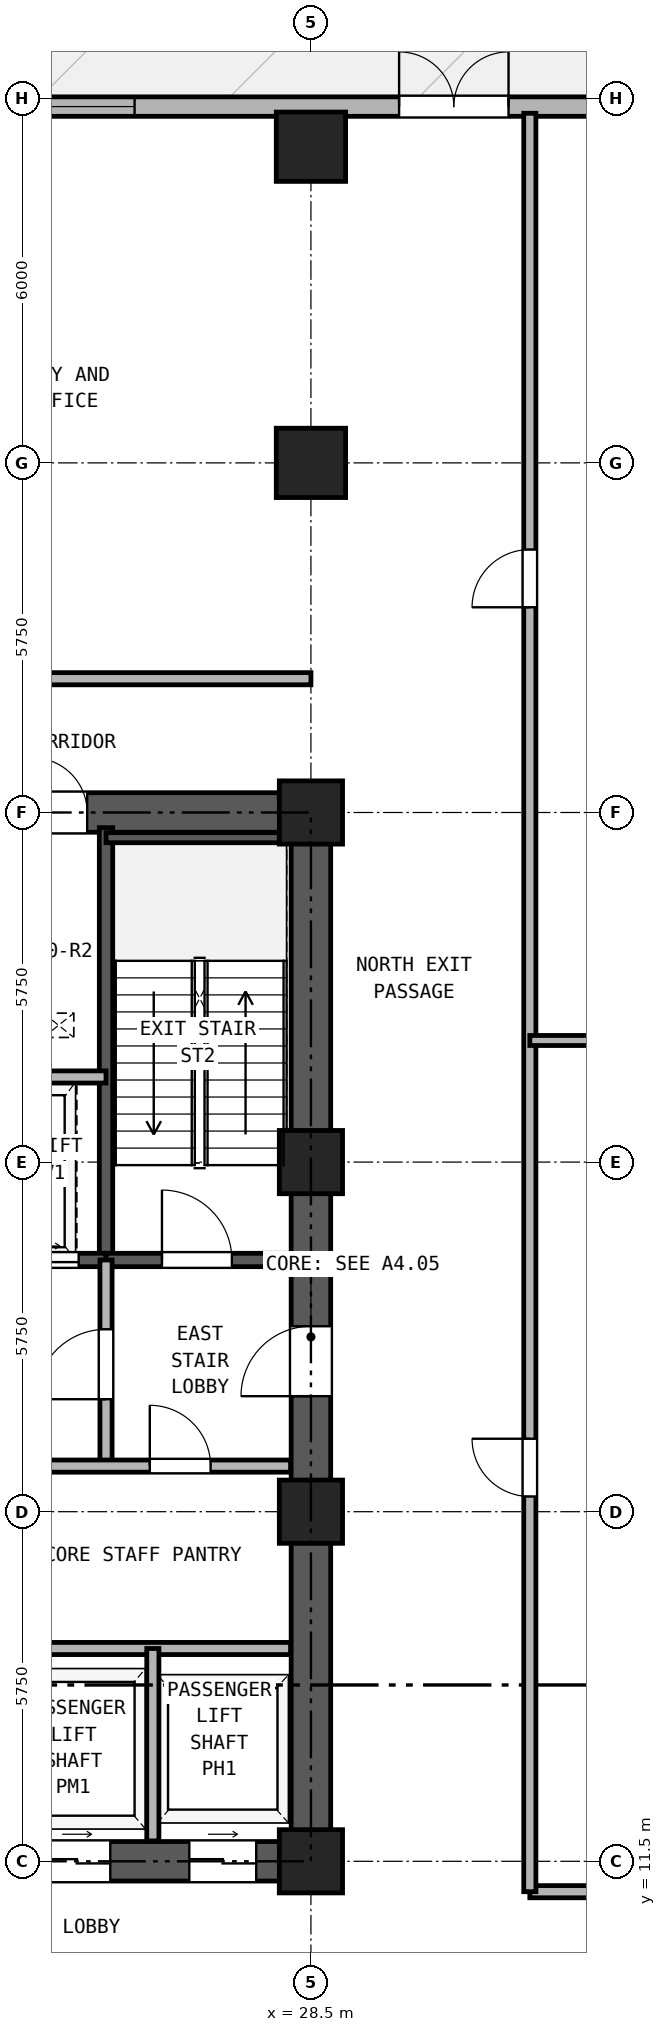
"""IFC4 building model, lengths in metres.
Left out: names, types, materials, properties, quantities, classifications, styles, units other than length and angle.
Written with IfcOpenShell. Run it as: python <this file> out.ifc"""

import sys

from ifc_helpers import new_model, si_unit, direction, frame, frame_2d, origin, origin_2d, place, context, subcontext, project, spatial, rectangle, hollow_rectangle, extrude, source, transform, mapped, element, fill, save


model = new_model("IFC4")
c1 = context("Model", 3, precision=1e-05, world=origin(), true_north=direction((0.0, 1.0)))
c2 = subcontext(c1, "Body", "Model", "MODEL_VIEW")
j1 = project(units=[si_unit("LENGTHUNIT", "METRE"), si_unit("PLANEANGLEUNIT", "RADIAN")], contexts=[c1])
p1 = place(None, origin())
s1 = spatial("IfcSite", under=j1, at=p1, CompositionType="ELEMENT")
p2 = place(p1, origin())
s2 = spatial("IfcBuilding", under=s1, at=p2, CompositionType="ELEMENT")
p3 = place(p2, origin())
s3 = spatial("IfcBuildingStorey", under=s2, at=p3, CompositionType="ELEMENT", Elevation=0.0)
m1 = source(origin(), c2, "Body", "SweptSolid", [
    extrude(hollow_rectangle(XDim=1.14, YDim=1.14, WallThickness=0.07, at=origin_2d()), origin(), (0.0, 0.0, 1.0), 4.18),
])
p4 = place(p3, frame((28.5, 39.7, 0.0), z_axis=(0.0, 0.0, 1.0), x_axis=(1.0, 0.0, 0.0)))
e1 = element("IfcColumn", 1, at=p4, inside=s3, PredefinedType="COLUMN", context=c2, shape_type="MappedRepresentation", body=[
    mapped(m1, transform((0.0, 0.0, 0.0), x_axis=(1.0, 0.0, 0.0), y_axis=(0.0, 1.0, 0.0), z_axis=(0.0, 0.0, 1.0), scale=1.0)),
])
m2 = source(origin(), c2, "Body", "SweptSolid", [
    extrude(hollow_rectangle(XDim=1.04, YDim=1.04, WallThickness=0.065, at=origin_2d()), origin(), (0.0, 0.0, 1.0), 4.18),
])
for number, where, z_axis, x_axis in (
    (2, (28.5, 11.5, 0.0), (0.0, 0.0, 1.0), (1.0, 0.0, 0.0)),
    (3, (28.5, 17.25, 0.0), (0.0, 0.0, 1.0), (1.0, 0.0, 0.0)),
    (4, (28.5, 23.0, 0.0), (0.0, 0.0, 1.0), (1.0, 0.0, 0.0)),
    (5, (28.5, 28.75, 0.0), (0.0, 0.0, 1.0), (1.0, 0.0, 0.0)),
):
    element("IfcColumn", number, at=place(p3, frame(where, z_axis=z_axis, x_axis=x_axis)), inside=s3, PredefinedType="COLUMN", context=c2, shape_type="MappedRepresentation", body=[
        mapped(m2, transform((0.0, 0.0, 0.0), x_axis=(1.0, 0.0, 0.0), y_axis=(0.0, 1.0, 0.0), z_axis=(0.0, 0.0, 1.0), scale=1.0)),
    ])
p5 = place(p3, frame((28.5, 34.5, 0.0), z_axis=(0.0, 0.0, 1.0), x_axis=(1.0, 0.0, 0.0)))
e6 = element("IfcColumn", 6, at=p5, inside=s3, PredefinedType="COLUMN", context=c2, shape_type="MappedRepresentation", body=[
    mapped(m1, transform((0.0, 0.0, 0.0), x_axis=(1.0, 0.0, 0.0), y_axis=(0.0, 1.0, 0.0), z_axis=(0.0, 0.0, 1.0), scale=1.0)),
])
p6 = place(p3, frame((4.0, 40.36, 0.0), z_axis=(0.0, 0.0, 1.0), x_axis=(1.0, 0.0, 0.0)))
e7 = element("IfcWall", 7, at=p6, inside=s3, PredefinedType="SOLIDWALL", context=c2, shape_type="SweptSolid", body=[
    extrude(rectangle(XDim=39.0, YDim=0.32, at=frame_2d((19.5, 0.0))), origin(), (0.0, 0.0, 1.0), 4.18),
])
p7 = place(p6, frame((12.1, 0.0, 0.0)))
e8 = element("IfcOpeningElement", 8, at=p7, cuts=e7, PredefinedType="OPENING", context=c2, shape_type="SweptSolid", body=[
    extrude(rectangle(XDim=1.8, YDim=2.35, at=frame_2d((0.9, 1.175))), frame((0.0, 0.17, 0.0), z_axis=(0.0, -1.0, 0.0), x_axis=(1.0, 0.0, 0.0)), (0.0, 0.0, 1.0), 0.34),
])
p8 = place(p6, frame((25.95, 0.0, 0.0)))
e9 = element("IfcOpeningElement", 9, at=p8, cuts=e7, PredefinedType="OPENING", context=c2, shape_type="SweptSolid", body=[
    extrude(rectangle(XDim=1.8, YDim=2.35, at=frame_2d((0.9, 1.175))), frame((0.0, 0.17, 0.0), z_axis=(0.0, -1.0, 0.0), x_axis=(1.0, 0.0, 0.0)), (0.0, 0.0, 1.0), 0.34),
])
p9 = place(p6, frame((4.2, 0.0, 0.9)))
e10 = element("IfcOpeningElement", 10, at=p9, cuts=e7, PredefinedType="OPENING", context=c2, shape_type="SweptSolid", body=[
    extrude(rectangle(XDim=2.4, YDim=2.1, at=frame_2d((1.2, 1.05))), frame((0.0, 0.17, 0.0), z_axis=(0.0, -1.0, 0.0), x_axis=(1.0, 0.0, 0.0)), (0.0, 0.0, 1.0), 0.34),
])
p10 = place(p6, frame((19.2, 0.0, 0.9)))
e11 = element("IfcOpeningElement", 11, at=p10, cuts=e7, PredefinedType="OPENING", context=c2, shape_type="SweptSolid", body=[
    extrude(rectangle(XDim=2.4, YDim=2.1, at=frame_2d((1.2, 1.05))), frame((0.0, 0.17, 0.0), z_axis=(0.0, -1.0, 0.0), x_axis=(1.0, 0.0, 0.0)), (0.0, 0.0, 1.0), 0.34),
])
p11 = place(p6, frame((31.8, 0.0, 0.9)))
e12 = element("IfcOpeningElement", 12, at=p11, cuts=e7, PredefinedType="OPENING", context=c2, shape_type="SweptSolid", body=[
    extrude(rectangle(XDim=2.4, YDim=2.1, at=frame_2d((1.2, 1.05))), frame((0.0, 0.17, 0.0), z_axis=(0.0, -1.0, 0.0), x_axis=(1.0, 0.0, 0.0)), (0.0, 0.0, 1.0), 0.34),
])
p12 = place(p3, frame((18.175, 11.5, 0.0), z_axis=(0.0, 0.0, 1.0), x_axis=(1.0, 0.0, 0.0)))
e13 = element("IfcWall", 13, at=p12, inside=s3, PredefinedType="SHEAR", context=c2, shape_type="SweptSolid", body=[
    extrude(rectangle(XDim=10.65, YDim=0.65, at=frame_2d((5.325, 0.0))), origin(), (0.0, 0.0, 1.0), 4.18),
])
p13 = place(p12, frame((1.195, 0.0, 0.0)))
e14 = element("IfcOpeningElement", 14, at=p13, cuts=e13, PredefinedType="OPENING", context=c2, shape_type="SweptSolid", body=[
    extrude(rectangle(XDim=1.1, YDim=2.25, at=frame_2d((0.55, 1.125))), frame((0.0, 0.335, 0.0), z_axis=(0.0, -1.0, 0.0), x_axis=(1.0, 0.0, 0.0)), (0.0, 0.0, 1.0), 0.67),
])
p14 = place(p12, frame((3.495, 0.0, 0.0)))
e15 = element("IfcOpeningElement", 15, at=p14, cuts=e13, PredefinedType="OPENING", context=c2, shape_type="SweptSolid", body=[
    extrude(rectangle(XDim=1.1, YDim=2.25, at=frame_2d((0.55, 1.125))), frame((0.0, 0.335, 0.0), z_axis=(0.0, -1.0, 0.0), x_axis=(1.0, 0.0, 0.0)), (0.0, 0.0, 1.0), 0.67),
])
p15 = place(p12, frame((5.925, 0.0, 0.0)))
e16 = element("IfcOpeningElement", 16, at=p15, cuts=e13, PredefinedType="OPENING", context=c2, shape_type="SweptSolid", body=[
    extrude(rectangle(XDim=1.1, YDim=2.25, at=frame_2d((0.55, 1.125))), frame((0.0, 0.335, 0.0), z_axis=(0.0, -1.0, 0.0), x_axis=(1.0, 0.0, 0.0)), (0.0, 0.0, 1.0), 0.67),
])
p16 = place(p12, frame((8.325, 0.0, 0.0)))
e17 = element("IfcOpeningElement", 17, at=p16, cuts=e13, PredefinedType="OPENING", context=c2, shape_type="SweptSolid", body=[
    extrude(rectangle(XDim=1.1, YDim=2.25, at=frame_2d((0.55, 1.125))), frame((0.0, 0.335, 0.0), z_axis=(0.0, -1.0, 0.0), x_axis=(1.0, 0.0, 0.0)), (0.0, 0.0, 1.0), 0.67),
])
p17 = place(p3, frame((18.175, 28.75, 0.0), z_axis=(0.0, 0.0, 1.0), x_axis=(1.0, 0.0, 0.0)))
e18 = element("IfcWall", 18, at=p17, inside=s3, PredefinedType="SHEAR", context=c2, shape_type="SweptSolid", body=[
    extrude(rectangle(XDim=10.65, YDim=0.65, at=frame_2d((5.325, 0.0))), origin(), (0.0, 0.0, 1.0), 4.18),
])
p18 = place(p17, frame((4.205, 0.0, 0.0)))
e19 = element("IfcOpeningElement", 19, at=p18, cuts=e18, PredefinedType="OPENING", context=c2, shape_type="SweptSolid", body=[
    extrude(rectangle(XDim=0.9, YDim=2.05, at=frame_2d((0.45, 1.025))), frame((0.0, 0.335, 0.0), z_axis=(0.0, -1.0, 0.0), x_axis=(1.0, 0.0, 0.0)), (0.0, 0.0, 1.0), 0.67),
])
p19 = place(p17, frame((5.745, 0.0, 0.0)))
e20 = element("IfcOpeningElement", 20, at=p19, cuts=e18, PredefinedType="OPENING", context=c2, shape_type="SweptSolid", body=[
    extrude(rectangle(XDim=0.9, YDim=2.05, at=frame_2d((0.45, 1.025))), frame((0.0, 0.335, 0.0), z_axis=(0.0, -1.0, 0.0), x_axis=(1.0, 0.0, 0.0)), (0.0, 0.0, 1.0), 0.67),
])
p20 = place(p3, frame((28.5, 11.825, 0.0), z_axis=(0.0, 0.0, 1.0), x_axis=(0.0, 1.0, 0.0)))
e21 = element("IfcWall", 21, at=p20, inside=s3, PredefinedType="SHEAR", context=c2, shape_type="SweptSolid", body=[
    extrude(rectangle(XDim=16.6, YDim=0.65, at=frame_2d((8.3, 0.0))), origin(), (0.0, 0.0, 1.0), 4.18),
])
p21 = place(p20, frame((7.325, 0.0, 0.0)))
e22 = element("IfcOpeningElement", 22, at=p21, cuts=e21, PredefinedType="OPENING", context=c2, shape_type="SweptSolid", body=[
    extrude(rectangle(XDim=1.15, YDim=2.2, at=frame_2d((0.575, 1.1))), frame((0.0, 0.335, 0.0), z_axis=(0.0, -1.0, 0.0), x_axis=(1.0, 0.0, 0.0)), (0.0, 0.0, 1.0), 0.67),
])
p22 = place(p3, frame((25.13, 21.39, 0.0), z_axis=(0.0, 0.0, 1.0), x_axis=(0.0, 1.0, 0.0)))
e23 = element("IfcWall", 23, at=p22, inside=s3, PredefinedType="SOLIDWALL", context=c2, shape_type="SweptSolid", body=[
    extrude(rectangle(XDim=7.11, YDim=0.22, at=frame_2d((3.555, 0.0))), origin(), (0.0, 0.0, 1.0), 4.18),
])
p23 = place(p3, frame((25.13, 28.335, 0.0), z_axis=(0.0, 0.0, 1.0), x_axis=(1.0, 0.0, 0.0)))
e24 = element("IfcWall", 24, at=p23, inside=s3, PredefinedType="PARTITIONING", context=c2, shape_type="SweptSolid", body=[
    extrude(rectangle(XDim=3.035, YDim=0.165, at=frame_2d((1.518, 0.0))), origin(), (0.0, 0.0, 1.0), 4.18),
])
p24 = place(p3, frame((18.835, 21.39, 0.0), z_axis=(0.0, 0.0, 1.0), x_axis=(1.0, 0.0, 0.0)))
e25 = element("IfcWall", 25, at=p24, inside=s3, PredefinedType="SOLIDWALL", context=c2, shape_type="SweptSolid", body=[
    extrude(rectangle(XDim=6.295, YDim=0.22, at=frame_2d((3.147, 0.0))), origin(), (0.0, 0.0, 1.0), 4.18),
])
p25 = place(p24, frame((1.015, 0.0, 0.0)))
e26 = element("IfcOpeningElement", 26, at=p25, cuts=e25, PredefinedType="OPENING", context=c2, shape_type="SweptSolid", body=[
    extrude(rectangle(XDim=1.15, YDim=2.2, at=frame_2d((0.575, 1.1))), frame((0.0, 0.12, 0.0), z_axis=(0.0, -1.0, 0.0), x_axis=(1.0, 0.0, 0.0)), (0.0, 0.0, 1.0), 0.24),
])
p26 = place(p24, frame((4.745, 0.0, 0.0)))
e27 = element("IfcOpeningElement", 27, at=p26, cuts=e25, PredefinedType="OPENING", context=c2, shape_type="SweptSolid", body=[
    extrude(rectangle(XDim=1.1, YDim=2.25, at=frame_2d((0.55, 1.125))), frame((0.0, 0.12, 0.0), z_axis=(0.0, -1.0, 0.0), x_axis=(1.0, 0.0, 0.0)), (0.0, 0.0, 1.0), 0.24),
])
p27 = place(p3, frame((25.13, 21.39, 0.0), z_axis=(0.0, 0.0, 1.0), x_axis=(1.0, 0.0, 0.0)))
e28 = element("IfcWall", 28, at=p27, inside=s3, PredefinedType="SOLIDWALL", context=c2, shape_type="SweptSolid", body=[
    extrude(rectangle(XDim=3.035, YDim=0.22, at=frame_2d((1.518, 0.0))), origin(), (0.0, 0.0, 1.0), 4.18),
])
p28 = place(p27, frame((0.92, 0.0, 0.0)))
e29 = element("IfcOpeningElement", 29, at=p28, cuts=e28, PredefinedType="OPENING", context=c2, shape_type="SweptSolid", body=[
    extrude(rectangle(XDim=1.15, YDim=2.2, at=frame_2d((0.575, 1.1))), frame((0.0, 0.12, 0.0), z_axis=(0.0, -1.0, 0.0), x_axis=(1.0, 0.0, 0.0)), (0.0, 0.0, 1.0), 0.24),
])
p29 = place(p3, frame((22.11, 24.4, 0.0), z_axis=(0.0, 0.0, 1.0), x_axis=(1.0, 0.0, 0.0)))
e30 = element("IfcWall", 30, at=p29, inside=s3, PredefinedType="PARTITIONING", context=c2, shape_type="SweptSolid", body=[
    extrude(rectangle(XDim=3.02, YDim=0.2, at=frame_2d((1.51, 0.0))), origin(), (0.0, 0.0, 1.0), 4.18),
])
p30 = place(p3, frame((25.13, 18.0, 0.0), z_axis=(0.0, 0.0, 1.0), x_axis=(0.0, 1.0, 0.0)))
e31 = element("IfcWall", 31, at=p30, inside=s3, PredefinedType="PARTITIONING", context=c2, shape_type="SweptSolid", body=[
    extrude(rectangle(XDim=3.39, YDim=0.2, at=frame_2d((1.695, 0.0))), origin(), (0.0, 0.0, 1.0), 4.18),
])
p31 = place(p30, frame((1.1, 0.0, 0.0)))
e32 = element("IfcOpeningElement", 32, at=p31, cuts=e31, PredefinedType="OPENING", context=c2, shape_type="SweptSolid", body=[
    extrude(rectangle(XDim=1.15, YDim=2.2, at=frame_2d((0.575, 1.1))), frame((0.0, 0.11, 0.0), z_axis=(0.0, -1.0, 0.0), x_axis=(1.0, 0.0, 0.0)), (0.0, 0.0, 1.0), 0.22),
])
p32 = place(p3, frame((18.835, 18.0, 0.0), z_axis=(0.0, 0.0, 1.0), x_axis=(1.0, 0.0, 0.0)))
e33 = element("IfcWall", 33, at=p32, inside=s3, PredefinedType="PARTITIONING", context=c2, shape_type="SweptSolid", body=[
    extrude(rectangle(XDim=9.33, YDim=0.2, at=frame_2d((4.665, 0.0))), origin(), (0.0, 0.0, 1.0), 4.18),
])
p33 = place(p32, frame((0.415, 0.0, 0.0)))
e34 = element("IfcOpeningElement", 34, at=p33, cuts=e33, PredefinedType="OPENING", context=c2, shape_type="SweptSolid", body=[
    extrude(rectangle(XDim=1.3, YDim=2.3, at=frame_2d((0.65, 1.15))), frame((0.0, 0.11, 0.0), z_axis=(0.0, -1.0, 0.0), x_axis=(1.0, 0.0, 0.0)), (0.0, 0.0, 1.0), 0.22),
])
p34 = place(p32, frame((2.515, 0.0, 0.0)))
e35 = element("IfcOpeningElement", 35, at=p34, cuts=e33, PredefinedType="OPENING", context=c2, shape_type="SweptSolid", body=[
    extrude(rectangle(XDim=1.3, YDim=2.3, at=frame_2d((0.65, 1.15))), frame((0.0, 0.11, 0.0), z_axis=(0.0, -1.0, 0.0), x_axis=(1.0, 0.0, 0.0)), (0.0, 0.0, 1.0), 0.22),
])
p35 = place(p32, frame((7.015, 0.0, 0.0)))
e36 = element("IfcOpeningElement", 36, at=p35, cuts=e33, PredefinedType="OPENING", context=c2, shape_type="SweptSolid", body=[
    extrude(rectangle(XDim=1.0, YDim=2.15, at=frame_2d((0.5, 1.075))), frame((0.0, 0.11, 0.0), z_axis=(0.0, -1.0, 0.0), x_axis=(1.0, 0.0, 0.0)), (0.0, 0.0, 1.0), 0.22),
])
p36 = place(p3, frame((18.835, 15.0, 0.0), z_axis=(0.0, 0.0, 1.0), x_axis=(1.0, 0.0, 0.0)))
e37 = element("IfcWall", 37, at=p36, inside=s3, PredefinedType="PARTITIONING", context=c2, shape_type="SweptSolid", body=[
    extrude(rectangle(XDim=9.33, YDim=0.2, at=frame_2d((4.665, 0.0))), origin(), (0.0, 0.0, 1.0), 4.18),
])
p37 = place(p3, frame((25.9, 11.835, 0.0), z_axis=(0.0, 0.0, 1.0), x_axis=(0.0, 1.0, 0.0)))
e38 = element("IfcWall", 38, at=p37, inside=s3, PredefinedType="PARTITIONING", context=c2, shape_type="SweptSolid", body=[
    extrude(rectangle(XDim=3.165, YDim=0.2, at=frame_2d((1.583, 0.0))), origin(), (0.0, 0.0, 1.0), 4.18),
])
p38 = place(p3, frame((32.1, 11.0, 0.0), z_axis=(0.0, 0.0, 1.0), x_axis=(1.0, 0.0, 0.0)))
e39 = element("IfcWall", 39, at=p38, inside=s3, PredefinedType="PARTITIONING", context=c2, shape_type="SweptSolid", body=[
    extrude(rectangle(XDim=14.65, YDim=0.2, at=frame_2d((7.325, 0.0))), origin(), (0.0, 0.0, 1.0), 4.18),
])
p39 = place(p3, frame((32.1, 11.0, 0.0), z_axis=(0.0, 0.0, 1.0), x_axis=(0.0, 1.0, 0.0)))
e40 = element("IfcWall", 40, at=p39, inside=s3, PredefinedType="PARTITIONING", context=c2, shape_type="SweptSolid", body=[
    extrude(rectangle(XDim=29.25, YDim=0.2, at=frame_2d((14.625, 0.0))), origin(), (0.0, 0.0, 1.0), 4.18),
])
p40 = place(p39, frame((6.5, 0.0, 0.0)))
e41 = element("IfcOpeningElement", 41, at=p40, cuts=e40, PredefinedType="OPENING", context=c2, shape_type="SweptSolid", body=[
    extrude(rectangle(XDim=0.95, YDim=2.15, at=frame_2d((0.475, 1.075))), frame((0.0, 0.11, 0.0), z_axis=(0.0, -1.0, 0.0), x_axis=(1.0, 0.0, 0.0)), (0.0, 0.0, 1.0), 0.22),
])
p41 = place(p39, frame((21.125, 0.0, 0.0)))
e42 = element("IfcOpeningElement", 42, at=p41, cuts=e40, PredefinedType="OPENING", context=c2, shape_type="SweptSolid", body=[
    extrude(rectangle(XDim=0.95, YDim=2.15, at=frame_2d((0.475, 1.075))), frame((0.0, 0.11, 0.0), z_axis=(0.0, -1.0, 0.0), x_axis=(1.0, 0.0, 0.0)), (0.0, 0.0, 1.0), 0.22),
])
p42 = place(p3, frame((15.8, 30.95, 0.0), z_axis=(0.0, 0.0, 1.0), x_axis=(1.0, 0.0, 0.0)))
e43 = element("IfcWall", 43, at=p42, inside=s3, PredefinedType="PARTITIONING", context=c2, shape_type="SweptSolid", body=[
    extrude(rectangle(XDim=12.7, YDim=0.2, at=frame_2d((6.35, 0.0))), origin(), (0.0, 0.0, 1.0), 4.18),
])
p43 = place(p42, frame((7.2, 0.0, 0.0)))
e44 = element("IfcOpeningElement", 44, at=p43, cuts=e43, PredefinedType="OPENING", context=c2, shape_type="SweptSolid", body=[
    extrude(rectangle(XDim=0.95, YDim=2.15, at=frame_2d((0.475, 1.075))), frame((0.0, 0.11, 0.0), z_axis=(0.0, -1.0, 0.0), x_axis=(1.0, 0.0, 0.0)), (0.0, 0.0, 1.0), 0.22),
])
p44 = place(p3, frame((32.1, 25.0, 0.0), z_axis=(0.0, 0.0, 1.0), x_axis=(1.0, 0.0, 0.0)))
e45 = element("IfcWall", 45, at=p44, inside=s3, PredefinedType="PARTITIONING", context=c2, shape_type="SweptSolid", body=[
    extrude(rectangle(XDim=14.65, YDim=0.165, at=frame_2d((7.325, 0.0))), origin(), (0.0, 0.0, 1.0), 4.18),
])
p45 = place(p8, origin())
e46 = element("IfcDoor", 46, at=p45, inside=s3, OperationType="DOUBLE_DOOR_SINGLE_SWING", PredefinedType="DOOR", context=c2, shape_type="SweptSolid", body=[
    extrude(rectangle(XDim=1.8, YDim=2.35, at=frame_2d((0.9, 1.175))), frame((0.0, 0.025, 0.0), z_axis=(0.0, -1.0, 0.0), x_axis=(1.0, 0.0, 0.0)), (0.0, 0.0, 1.0), 0.05),
])
fill(e9, e46)
p46 = place(p10, origin())
e47 = element("IfcWindow", 47, at=p46, inside=s3, PartitioningType="SINGLE_PANEL", PredefinedType="WINDOW", context=c2, shape_type="SweptSolid", body=[
    extrude(rectangle(XDim=2.4, YDim=2.1, at=frame_2d((1.2, 1.05))), frame((0.0, 0.03, 0.0), z_axis=(0.0, -1.0, 0.0), x_axis=(1.0, 0.0, 0.0)), (0.0, 0.0, 1.0), 0.06),
])
fill(e11, e47)
p47 = place(p28, frame((1.15, 0.0, 0.0), z_axis=(0.0, 0.0, 1.0), x_axis=(-1.0, 0.0, 0.0)))
e48 = element("IfcDoor", 48, at=p47, inside=s3, OperationType="SINGLE_SWING_LEFT", PredefinedType="DOOR", context=c2, shape_type="SweptSolid", body=[
    extrude(rectangle(XDim=1.15, YDim=2.2, at=frame_2d((0.575, 1.1))), frame((0.0, 0.025, 0.0), z_axis=(0.0, -1.0, 0.0), x_axis=(1.0, 0.0, 0.0)), (0.0, 0.0, 1.0), 0.05),
])
fill(e29, e48)
p48 = place(p26, frame((1.1, 0.0, 0.0), z_axis=(0.0, 0.0, 1.0), x_axis=(-1.0, 0.0, 0.0)))
e49 = element("IfcDoor", 49, at=p48, inside=s3, OperationType="DOUBLE_DOOR_SLIDING", PredefinedType="DOOR", context=c2, shape_type="SweptSolid", body=[
    extrude(rectangle(XDim=1.1, YDim=2.25, at=frame_2d((0.55, 1.125))), frame((0.0, 0.025, 0.0), z_axis=(0.0, -1.0, 0.0), x_axis=(1.0, 0.0, 0.0)), (0.0, 0.0, 1.0), 0.05),
])
fill(e27, e49)
p49 = place(p31, origin())
e50 = element("IfcDoor", 50, at=p49, inside=s3, OperationType="SINGLE_SWING_LEFT", PredefinedType="DOOR", context=c2, shape_type="SweptSolid", body=[
    extrude(rectangle(XDim=1.15, YDim=2.2, at=frame_2d((0.575, 1.1))), frame((0.0, 0.025, 0.0), z_axis=(0.0, -1.0, 0.0), x_axis=(1.0, 0.0, 0.0)), (0.0, 0.0, 1.0), 0.05),
])
fill(e32, e50)
p50 = place(p35, frame((1.0, 0.0, 0.0), z_axis=(0.0, 0.0, 1.0), x_axis=(-1.0, 0.0, 0.0)))
e51 = element("IfcDoor", 51, at=p50, inside=s3, OperationType="SINGLE_SWING_LEFT", PredefinedType="DOOR", context=c2, shape_type="SweptSolid", body=[
    extrude(rectangle(XDim=1.0, YDim=2.15, at=frame_2d((0.5, 1.075))), frame((0.0, 0.025, 0.0), z_axis=(0.0, -1.0, 0.0), x_axis=(1.0, 0.0, 0.0)), (0.0, 0.0, 1.0), 0.05),
])
fill(e36, e51)
p51 = place(p21, origin())
e52 = element("IfcDoor", 52, at=p51, inside=s3, OperationType="SINGLE_SWING_LEFT", PredefinedType="DOOR", context=c2, shape_type="SweptSolid", body=[
    extrude(rectangle(XDim=1.15, YDim=2.2, at=frame_2d((0.575, 1.1))), frame((0.0, 0.025, 0.0), z_axis=(0.0, -1.0, 0.0), x_axis=(1.0, 0.0, 0.0)), (0.0, 0.0, 1.0), 0.05),
])
fill(e22, e52)
p52 = place(p19, origin())
e53 = element("IfcDoor", 53, at=p52, inside=s3, OperationType="SINGLE_SWING_LEFT", PredefinedType="DOOR", context=c2, shape_type="SweptSolid", body=[
    extrude(rectangle(XDim=0.9, YDim=2.05, at=frame_2d((0.45, 1.025))), frame((0.0, 0.025, 0.0), z_axis=(0.0, -1.0, 0.0), x_axis=(1.0, 0.0, 0.0)), (0.0, 0.0, 1.0), 0.05),
])
fill(e20, e53)
p53 = place(p15, frame((1.1, 0.0, 0.0), z_axis=(0.0, 0.0, 1.0), x_axis=(-1.0, 0.0, 0.0)))
e54 = element("IfcDoor", 54, at=p53, inside=s3, OperationType="DOUBLE_DOOR_SLIDING", PredefinedType="DOOR", context=c2, shape_type="SweptSolid", body=[
    extrude(rectangle(XDim=1.1, YDim=2.25, at=frame_2d((0.55, 1.125))), frame((0.0, 0.025, 0.0), z_axis=(0.0, -1.0, 0.0), x_axis=(1.0, 0.0, 0.0)), (0.0, 0.0, 1.0), 0.05),
])
fill(e16, e54)
p54 = place(p16, frame((1.1, 0.0, 0.0), z_axis=(0.0, 0.0, 1.0), x_axis=(-1.0, 0.0, 0.0)))
e55 = element("IfcDoor", 55, at=p54, inside=s3, OperationType="DOUBLE_DOOR_SLIDING", PredefinedType="DOOR", context=c2, shape_type="SweptSolid", body=[
    extrude(rectangle(XDim=1.1, YDim=2.25, at=frame_2d((0.55, 1.125))), frame((0.0, 0.025, 0.0), z_axis=(0.0, -1.0, 0.0), x_axis=(1.0, 0.0, 0.0)), (0.0, 0.0, 1.0), 0.05),
])
fill(e17, e55)
p55 = place(p40, origin())
e56 = element("IfcDoor", 56, at=p55, inside=s3, OperationType="SINGLE_SWING_RIGHT", PredefinedType="DOOR", context=c2, shape_type="SweptSolid", body=[
    extrude(rectangle(XDim=0.95, YDim=2.15, at=frame_2d((0.475, 1.075))), frame((0.0, 0.025, 0.0), z_axis=(0.0, -1.0, 0.0), x_axis=(1.0, 0.0, 0.0)), (0.0, 0.0, 1.0), 0.05),
])
fill(e41, e56)
p56 = place(p41, origin())
e57 = element("IfcDoor", 57, at=p56, inside=s3, OperationType="SINGLE_SWING_LEFT", PredefinedType="DOOR", context=c2, shape_type="SweptSolid", body=[
    extrude(rectangle(XDim=0.95, YDim=2.15, at=frame_2d((0.475, 1.075))), frame((0.0, 0.025, 0.0), z_axis=(0.0, -1.0, 0.0), x_axis=(1.0, 0.0, 0.0)), (0.0, 0.0, 1.0), 0.05),
])
fill(e42, e57)
save(model, sys.argv[1])
